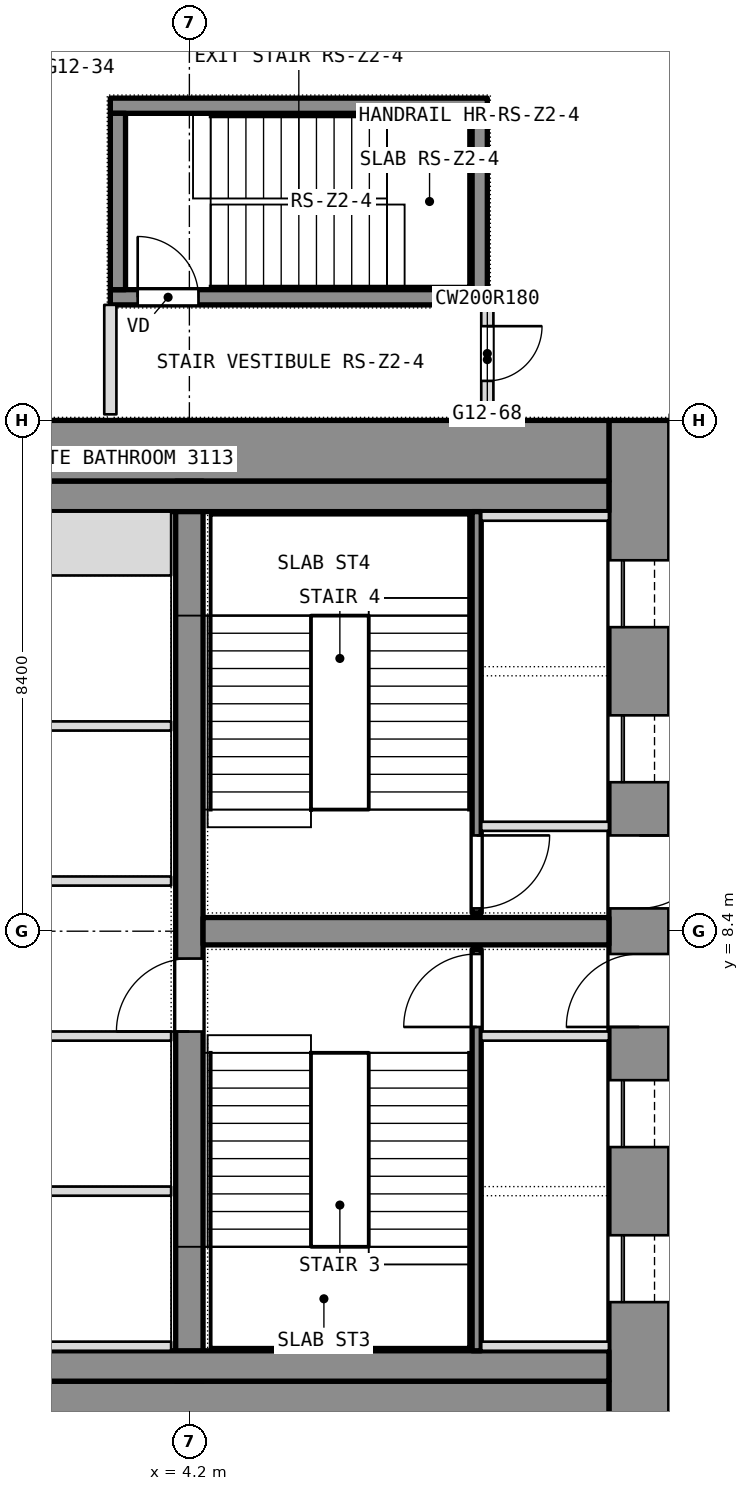
"""IFC4 building model, lengths in metres.
Left out: names, types, materials, properties, quantities, classifications, styles, units other than length and angle.
Written with IfcOpenShell. Run it as: python <this file> out.ifc"""

import sys

from ifc_helpers import new_model, si_unit, direction, frame, frame_2d, origin, place, context, subcontext, project, spatial, rectangle, extrude, element, fill, save


model = new_model("IFC4")
c1 = context("Model", 3, precision=1e-05, world=origin(), true_north=direction((0.0, 1.0)))
c2 = subcontext(c1, "Body", "Model", "MODEL_VIEW")
j1 = project(units=[si_unit("LENGTHUNIT", "METRE"), si_unit("PLANEANGLEUNIT", "RADIAN")], contexts=[c1])
p1 = place(None, origin())
s1 = spatial("IfcSite", under=j1, at=p1, CompositionType="ELEMENT")
p2 = place(p1, origin())
s2 = spatial("IfcBuilding", under=s1, at=p2, CompositionType="ELEMENT")
p3 = place(p2, frame((0.0, 0.0, 137.3)))
s3 = spatial("IfcBuildingStorey", under=s2, at=p3, CompositionType="ELEMENT", Elevation=137.3)
p4 = place(p3, frame((11.6, 0.0, 0.0), z_axis=(0.0, 0.0, 1.0), x_axis=(0.0, 1.0, 0.0)))
e1 = element("IfcWall", 1, at=p4, inside=s3, PredefinedType="SHEAR", context=c2, shape_type="SweptSolid", body=[
    extrude(rectangle(XDim=16.8, YDim=1.0, at=frame_2d((8.4, 0.0))), origin(), (0.0, 0.0, 1.0), 3.6),
])
p5 = place(p4, frame((2.3, 0.0, 0.0)))
e2 = element("IfcOpeningElement", 2, at=p5, cuts=e1, PredefinedType="OPENING", context=c2, shape_type="SweptSolid", body=[
    extrude(rectangle(XDim=1.1, YDim=2.1, at=frame_2d((0.55, 1.05))), frame((0.0, 0.5, 0.0), z_axis=(0.0, -1.0, 0.0), x_axis=(1.0, 0.0, 0.0)), (0.0, 0.0, 1.0), 1.0),
])
p6 = place(p4, frame((4.85, 0.0, 0.0)))
e3 = element("IfcOpeningElement", 3, at=p6, cuts=e1, PredefinedType="OPENING", context=c2, shape_type="SweptSolid", body=[
    extrude(rectangle(XDim=1.1, YDim=2.1, at=frame_2d((0.55, 1.05))), frame((0.0, 0.5, 0.0), z_axis=(0.0, -1.0, 0.0), x_axis=(1.0, 0.0, 0.0)), (0.0, 0.0, 1.0), 1.0),
])
p7 = place(p4, frame((6.825, 0.0, 0.0)))
e4 = element("IfcOpeningElement", 4, at=p7, cuts=e1, PredefinedType="OPENING", context=c2, shape_type="SweptSolid", body=[
    extrude(rectangle(XDim=1.2, YDim=2.1, at=frame_2d((0.6, 1.05))), frame((0.0, 0.5, 0.0), z_axis=(0.0, -1.0, 0.0), x_axis=(1.0, 0.0, 0.0)), (0.0, 0.0, 1.0), 1.0),
])
p8 = place(p4, frame((13.4, 0.0, 0.0)))
e5 = element("IfcOpeningElement", 5, at=p8, cuts=e1, PredefinedType="OPENING", context=c2, shape_type="SweptSolid", body=[
    extrude(rectangle(XDim=1.1, YDim=2.1, at=frame_2d((0.55, 1.05))), frame((0.0, 0.5, 0.0), z_axis=(0.0, -1.0, 0.0), x_axis=(1.0, 0.0, 0.0)), (0.0, 0.0, 1.0), 1.0),
])
p9 = place(p4, frame((10.85, 0.0, 0.0)))
e6 = element("IfcOpeningElement", 6, at=p9, cuts=e1, PredefinedType="OPENING", context=c2, shape_type="SweptSolid", body=[
    extrude(rectangle(XDim=1.1, YDim=2.1, at=frame_2d((0.55, 1.05))), frame((0.0, 0.5, 0.0), z_axis=(0.0, -1.0, 0.0), x_axis=(1.0, 0.0, 0.0)), (0.0, 0.0, 1.0), 1.0),
])
p10 = place(p4, frame((8.775, 0.0, 0.0)))
e7 = element("IfcOpeningElement", 7, at=p10, cuts=e1, PredefinedType="OPENING", context=c2, shape_type="SweptSolid", body=[
    extrude(rectangle(XDim=1.2, YDim=2.1, at=frame_2d((0.6, 1.05))), frame((0.0, 0.5, 0.0), z_axis=(0.0, -1.0, 0.0), x_axis=(1.0, 0.0, 0.0)), (0.0, 0.0, 1.0), 1.0),
])
for number, where, z_axis, x_axis in (
    (8, (-11.1, 0.5, 0.0), (0.0, 0.0, 1.0), (1.0, 0.0, 0.0)),
    (9, (-11.1, 16.3, 0.0), (0.0, 0.0, 1.0), (1.0, 0.0, 0.0)),
):
    element("IfcWall", number, at=place(p3, frame(where, z_axis=z_axis, x_axis=x_axis)), inside=s3, PredefinedType="SHEAR", context=c2, shape_type="SweptSolid", body=[
        extrude(rectangle(XDim=22.2, YDim=1.0, at=frame_2d((11.1, 0.0))), origin(), (0.0, 0.0, 1.0), 3.6),
    ])
p11 = place(p3, frame((4.2, 1.0, 0.0), z_axis=(0.0, 0.0, 1.0), x_axis=(0.0, 1.0, 0.0)))
e10 = element("IfcWall", 10, at=p11, inside=s3, PredefinedType="SHEAR", context=c2, shape_type="SweptSolid", body=[
    extrude(rectangle(XDim=14.8, YDim=0.45, at=frame_2d((7.4, 0.0))), origin(), (0.0, 0.0, 1.0), 3.6),
])
p12 = place(p11, frame((5.75, 0.0, 0.0)))
e11 = element("IfcOpeningElement", 11, at=p12, cuts=e10, PredefinedType="OPENING", context=c2, shape_type="SweptSolid", body=[
    extrude(rectangle(XDim=1.2, YDim=2.1, at=frame_2d((0.6, 1.05))), frame((0.0, 0.225, 0.0), z_axis=(0.0, -1.0, 0.0), x_axis=(1.0, 0.0, 0.0)), (0.0, 0.0, 1.0), 0.45),
])
p13 = place(p3, frame((4.425, 8.4, 0.0), z_axis=(0.0, 0.0, 1.0), x_axis=(1.0, 0.0, 0.0)))
e12 = element("IfcWall", 12, at=p13, inside=s3, PredefinedType="SHEAR", context=c2, shape_type="SweptSolid", body=[
    extrude(rectangle(XDim=6.675, YDim=0.45, at=frame_2d((3.337, 0.0))), origin(), (0.0, 0.0, 1.0), 3.6),
])
p14 = place(p3, frame((9.1, 16.9, 0.0), z_axis=(0.0, 0.0, 1.0), x_axis=(0.0, 1.0, 0.0)))
e13 = element("IfcWall", 13, at=p14, inside=s3, PredefinedType="PARTITIONING", context=c2, shape_type="SweptSolid", body=[
    extrude(rectangle(XDim=1.8, YDim=0.2, at=frame_2d((0.9, 0.0))), origin(), (0.0, 0.0, 1.0), 3.34),
])
p15 = place(p14, frame((0.55, 0.0, 0.0)))
e14 = element("IfcOpeningElement", 14, at=p15, cuts=e13, PredefinedType="OPENING", context=c2, shape_type="SweptSolid", body=[
    extrude(rectangle(XDim=0.9, YDim=2.1, at=frame_2d((0.45, 1.05))), frame((0.0, 0.1, 0.0), z_axis=(0.0, -1.0, 0.0), x_axis=(1.0, 0.0, 0.0)), (0.0, 0.0, 1.0), 0.2),
])
p16 = place(p3, frame((2.9, 16.9, 0.0), z_axis=(0.0, 0.0, 1.0), x_axis=(0.0, 1.0, 0.0)))
e15 = element("IfcWall", 15, at=p16, inside=s3, PredefinedType="PARTITIONING", context=c2, shape_type="SweptSolid", body=[
    extrude(rectangle(XDim=1.8, YDim=0.2, at=frame_2d((0.9, 0.0))), origin(), (0.0, 0.0, 1.0), 3.34),
])
for number, where, z_axis, x_axis in (
    (16, (-11.1, 1.25, 0.0), (0.0, 0.0, 1.0), (1.0, 0.0, 0.0)),
    (17, (-11.1, 15.55, 0.0), (0.0, 0.0, 1.0), (1.0, 0.0, 0.0)),
):
    element("IfcWall", number, at=place(p3, frame(where, z_axis=z_axis, x_axis=x_axis)), inside=s3, PredefinedType="PARTITIONING", context=c2, shape_type="SweptSolid", body=[
        extrude(rectangle(XDim=22.2, YDim=0.5, at=frame_2d((11.1, 0.0))), origin(), (0.0, 0.0, 1.0), 3.34),
    ])
p17 = place(p3, frame((8.925, 1.5, 0.0), z_axis=(0.0, 0.0, 1.0), x_axis=(0.0, 1.0, 0.0)))
e18 = element("IfcWall", 18, at=p17, inside=s3, PredefinedType="SHEAR", context=c2, shape_type="SweptSolid", body=[
    extrude(rectangle(XDim=6.6, YDim=0.15, at=frame_2d((3.3, 0.0))), origin(), (0.0, 0.0, 1.0), 3.34),
])
p18 = place(p17, frame((5.325, 0.0, 0.0)))
e19 = element("IfcOpeningElement", 19, at=p18, cuts=e18, PredefinedType="OPENING", context=c2, shape_type="SweptSolid", body=[
    extrude(rectangle(XDim=1.2, YDim=2.1, at=frame_2d((0.6, 1.05))), frame((0.0, 0.075, 0.0), z_axis=(0.0, -1.0, 0.0), x_axis=(1.0, 0.0, 0.0)), (0.0, 0.0, 1.0), 0.15),
])
for number, where, z_axis, x_axis in (
    (20, (9.0, 6.675, 0.0), (0.0, 0.0, 1.0), (1.0, 0.0, 0.0)),
    (21, (9.0, 1.575, 0.0), (0.0, 0.0, 1.0), (1.0, 0.0, 0.0)),
):
    element("IfcWall", number, at=place(p3, frame(where, z_axis=z_axis, x_axis=x_axis)), inside=s3, PredefinedType="SHEAR", context=c2, shape_type="SweptSolid", body=[
        extrude(rectangle(XDim=2.1, YDim=0.15, at=frame_2d((1.05, 0.0))), origin(), (0.0, 0.0, 1.0), 3.6),
    ])
p19 = place(p3, frame((8.925, 8.7, 0.0), z_axis=(0.0, 0.0, 1.0), x_axis=(0.0, 1.0, 0.0)))
e22 = element("IfcWall", 22, at=p19, inside=s3, PredefinedType="SHEAR", context=c2, shape_type="SweptSolid", body=[
    extrude(rectangle(XDim=6.6, YDim=0.15, at=frame_2d((3.3, 0.0))), origin(), (0.0, 0.0, 1.0), 3.34),
])
p20 = place(p19, frame((0.075, 0.0, 0.0)))
e23 = element("IfcOpeningElement", 23, at=p20, cuts=e22, PredefinedType="OPENING", context=c2, shape_type="SweptSolid", body=[
    extrude(rectangle(XDim=1.2, YDim=2.1, at=frame_2d((0.6, 1.05))), frame((0.0, 0.075, 0.0), z_axis=(0.0, -1.0, 0.0), x_axis=(1.0, 0.0, 0.0)), (0.0, 0.0, 1.0), 0.15),
])
for number, where, z_axis, x_axis in (
    (24, (9.0, 10.125, 0.0), (0.0, 0.0, 1.0), (1.0, 0.0, 0.0)),
    (25, (9.0, 15.225, 0.0), (0.0, 0.0, 1.0), (1.0, 0.0, 0.0)),
):
    element("IfcWall", number, at=place(p3, frame(where, z_axis=z_axis, x_axis=x_axis)), inside=s3, PredefinedType="SHEAR", context=c2, shape_type="SweptSolid", body=[
        extrude(rectangle(XDim=2.1, YDim=0.15, at=frame_2d((1.05, 0.0))), origin(), (0.0, 0.0, 1.0), 3.6),
    ])
p21 = place(p3, frame((-3.9, 4.125, 0.0), z_axis=(0.0, 0.0, 1.0), x_axis=(1.0, 0.0, 0.0)))
e26 = element("IfcWall", 26, at=p21, inside=s3, PredefinedType="PARTITIONING", context=c2, shape_type="SweptSolid", body=[
    extrude(rectangle(XDim=7.8, YDim=0.15, at=frame_2d((3.9, 0.0))), origin(), (0.0, 0.0, 1.0), 3.34),
])
p22 = place(p21, frame((3.75, 0.0, 0.0)))
e27 = element("IfcOpeningElement", 27, at=p22, cuts=e26, PredefinedType="OPENING", context=c2, shape_type="SweptSolid", body=[
    extrude(rectangle(XDim=1.2, YDim=2.1, at=frame_2d((0.6, 1.05))), frame((0.0, 0.075, 0.0), z_axis=(0.0, -1.0, 0.0), x_axis=(1.0, 0.0, 0.0)), (0.0, 0.0, 1.0), 0.15),
])
p23 = place(p3, frame((-3.9, 11.775, 0.0), z_axis=(0.0, 0.0, 1.0), x_axis=(1.0, 0.0, 0.0)))
e28 = element("IfcWall", 28, at=p23, inside=s3, PredefinedType="PARTITIONING", context=c2, shape_type="SweptSolid", body=[
    extrude(rectangle(XDim=7.8, YDim=0.15, at=frame_2d((3.9, 0.0))), origin(), (0.0, 0.0, 1.0), 3.34),
])
p24 = place(p23, frame((3.3, 0.0, 0.0)))
e29 = element("IfcOpeningElement", 29, at=p24, cuts=e28, PredefinedType="OPENING", context=c2, shape_type="SweptSolid", body=[
    extrude(rectangle(XDim=1.2, YDim=2.1, at=frame_2d((0.6, 1.05))), frame((0.0, 0.075, 0.0), z_axis=(0.0, -1.0, 0.0), x_axis=(1.0, 0.0, 0.0)), (0.0, 0.0, 1.0), 0.15),
])
p25 = place(p3, frame((1.65, 1.575, 0.0), z_axis=(0.0, 0.0, 1.0), x_axis=(1.0, 0.0, 0.0)))
e30 = element("IfcWall", 30, at=p25, inside=s3, PredefinedType="SHEAR", context=c2, shape_type="SweptSolid", body=[
    extrude(rectangle(XDim=2.25, YDim=0.15, at=frame_2d((1.125, 0.0))), origin(), (0.0, 0.0, 1.0), 3.6),
])
p26 = place(p3, frame((1.65, 14.775, 0.0), z_axis=(0.0, 0.0, 1.0), x_axis=(1.0, 0.0, 0.0)))
e31 = element("IfcWall", 31, at=p26, inside=s3, PredefinedType="SHEAR", context=c2, shape_type="SweptSolid", body=[
    extrude(rectangle(XDim=2.25, YDim=1.05, at=frame_2d((1.125, 0.0))), origin(), (0.0, 0.0, 1.0), 3.6),
])
for number, where, z_axis, x_axis in (
    (32, (1.65, 6.675, 0.0), (0.0, 0.0, 1.0), (1.0, 0.0, 0.0)),
    (33, (1.65, 9.225, 0.0), (0.0, 0.0, 1.0), (1.0, 0.0, 0.0)),
):
    element("IfcWall", number, at=place(p3, frame(where, z_axis=z_axis, x_axis=x_axis)), inside=s3, PredefinedType="SHEAR", context=c2, shape_type="SweptSolid", body=[
        extrude(rectangle(XDim=2.25, YDim=0.15, at=frame_2d((1.125, 0.0))), origin(), (0.0, 0.0, 1.0), 3.6),
    ])
p27 = place(p3, frame((12.1, 16.8, 0.0), z_axis=(0.0, 0.0, 1.0), x_axis=(1.0, 0.0, 0.0)))
e34 = element("IfcWall", 34, at=p27, inside=s3, PredefinedType="PARTITIONING", context=c2, shape_type="SweptSolid", body=[
    extrude(rectangle(XDim=4.6, YDim=0.2, at=frame_2d((2.3, 0.0))), origin(), (0.0, 0.0, 1.0), 2.89),
])
p28 = place(p3, frame((2.9, 18.825, 0.1), z_axis=(0.0, 0.0, 1.0), x_axis=(1.0, 0.0, 0.0)))
e35 = element("IfcWall", 35, at=p28, inside=s3, PredefinedType="SHEAR", context=c2, shape_type="SweptSolid", body=[
    extrude(rectangle(XDim=6.2, YDim=0.25, at=frame_2d((3.1, 0.0))), origin(), (0.0, 0.0, 1.0), 3.6),
])
p29 = place(p28, frame((0.45, 0.0, 0.0)))
e36 = element("IfcOpeningElement", 36, at=p29, cuts=e35, PredefinedType="OPENING", context=c2, shape_type="SweptSolid", body=[
    extrude(rectangle(XDim=1.0, YDim=2.1, at=frame_2d((0.5, 1.05))), frame((0.0, 0.125, 0.0), z_axis=(0.0, -1.0, 0.0), x_axis=(1.0, 0.0, 0.0)), (0.0, 0.0, 1.0), 0.25),
])
p30 = place(p3, frame((2.9, 21.975, 0.1), z_axis=(0.0, 0.0, 1.0), x_axis=(1.0, 0.0, 0.0)))
e37 = element("IfcWall", 37, at=p30, inside=s3, PredefinedType="SHEAR", context=c2, shape_type="SweptSolid", body=[
    extrude(rectangle(XDim=6.2, YDim=0.25, at=frame_2d((3.1, 0.0))), origin(), (0.0, 0.0, 1.0), 3.6),
])
for number, where, z_axis, x_axis in (
    (38, (3.025, 18.95, 0.1), (0.0, 0.0, 1.0), (0.0, 1.0, 0.0)),
    (39, (8.975, 18.95, 0.1), (0.0, 0.0, 1.0), (0.0, 1.0, 0.0)),
):
    element("IfcWall", number, at=place(p3, frame(where, z_axis=z_axis, x_axis=x_axis)), inside=s3, PredefinedType="SHEAR", context=c2, shape_type="SweptSolid", body=[
        extrude(rectangle(XDim=2.9, YDim=0.25, at=frame_2d((1.45, 0.0))), origin(), (0.0, 0.0, 1.0), 3.6),
    ])
p31 = place(p15, origin())
e40 = element("IfcDoor", 40, at=p31, inside=s3, OperationType="SINGLE_SWING_RIGHT", PredefinedType="DOOR", context=c2, shape_type="SweptSolid", body=[
    extrude(rectangle(XDim=0.9, YDim=2.1, at=frame_2d((0.45, 1.05))), frame((0.0, 0.025, 0.0), z_axis=(0.0, -1.0, 0.0), x_axis=(1.0, 0.0, 0.0)), (0.0, 0.0, 1.0), 0.05),
])
fill(e14, e40)
p32 = place(p29, origin())
e41 = element("IfcDoor", 41, at=p32, inside=s3, OperationType="SINGLE_SWING_LEFT", PredefinedType="DOOR", context=c2, shape_type="SweptSolid", body=[
    extrude(rectangle(XDim=1.0, YDim=2.1, at=frame_2d((0.5, 1.05))), frame((0.0, 0.025, 0.0), z_axis=(0.0, -1.0, 0.0), x_axis=(1.0, 0.0, 0.0)), (0.0, 0.0, 1.0), 0.05),
])
fill(e36, e41)
p33 = place(p5, origin())
e42 = element("IfcDoor", 42, at=p33, inside=s3, OperationType="SLIDING_TO_LEFT", PredefinedType="DOOR", context=c2, shape_type="SweptSolid", body=[
    extrude(rectangle(XDim=1.1, YDim=2.1, at=frame_2d((0.55, 1.05))), frame((0.0, 0.025, 0.0), z_axis=(0.0, -1.0, 0.0), x_axis=(1.0, 0.0, 0.0)), (0.0, 0.0, 1.0), 0.05),
])
fill(e2, e42)
p34 = place(p6, origin())
e43 = element("IfcDoor", 43, at=p34, inside=s3, OperationType="SLIDING_TO_LEFT", PredefinedType="DOOR", context=c2, shape_type="SweptSolid", body=[
    extrude(rectangle(XDim=1.1, YDim=2.1, at=frame_2d((0.55, 1.05))), frame((0.0, 0.025, 0.0), z_axis=(0.0, -1.0, 0.0), x_axis=(1.0, 0.0, 0.0)), (0.0, 0.0, 1.0), 0.05),
])
fill(e3, e43)
p35 = place(p7, origin())
e44 = element("IfcDoor", 44, at=p35, inside=s3, OperationType="SINGLE_SWING_LEFT", PredefinedType="DOOR", context=c2, shape_type="SweptSolid", body=[
    extrude(rectangle(XDim=1.2, YDim=2.1, at=frame_2d((0.6, 1.05))), frame((0.0, 0.025, 0.0), z_axis=(0.0, -1.0, 0.0), x_axis=(1.0, 0.0, 0.0)), (0.0, 0.0, 1.0), 0.05),
])
fill(e4, e44)
p36 = place(p18, origin())
e45 = element("IfcDoor", 45, at=p36, inside=s3, OperationType="SINGLE_SWING_LEFT", PredefinedType="DOOR", context=c2, shape_type="SweptSolid", body=[
    extrude(rectangle(XDim=1.2, YDim=2.1, at=frame_2d((0.6, 1.05))), frame((0.0, 0.025, 0.0), z_axis=(0.0, -1.0, 0.0), x_axis=(1.0, 0.0, 0.0)), (0.0, 0.0, 1.0), 0.05),
])
fill(e19, e45)
p37 = place(p8, origin())
e46 = element("IfcDoor", 46, at=p37, inside=s3, OperationType="SLIDING_TO_LEFT", PredefinedType="DOOR", context=c2, shape_type="SweptSolid", body=[
    extrude(rectangle(XDim=1.1, YDim=2.1, at=frame_2d((0.55, 1.05))), frame((0.0, 0.025, 0.0), z_axis=(0.0, -1.0, 0.0), x_axis=(1.0, 0.0, 0.0)), (0.0, 0.0, 1.0), 0.05),
])
fill(e5, e46)
p38 = place(p9, origin())
e47 = element("IfcDoor", 47, at=p38, inside=s3, OperationType="SLIDING_TO_LEFT", PredefinedType="DOOR", context=c2, shape_type="SweptSolid", body=[
    extrude(rectangle(XDim=1.1, YDim=2.1, at=frame_2d((0.55, 1.05))), frame((0.0, 0.025, 0.0), z_axis=(0.0, -1.0, 0.0), x_axis=(1.0, 0.0, 0.0)), (0.0, 0.0, 1.0), 0.05),
])
fill(e6, e47)
p39 = place(p10, origin())
e48 = element("IfcDoor", 48, at=p39, inside=s3, OperationType="SINGLE_SWING_LEFT", PredefinedType="DOOR", context=c2, shape_type="SweptSolid", body=[
    extrude(rectangle(XDim=1.2, YDim=2.1, at=frame_2d((0.6, 1.05))), frame((0.0, 0.025, 0.0), z_axis=(0.0, -1.0, 0.0), x_axis=(1.0, 0.0, 0.0)), (0.0, 0.0, 1.0), 0.05),
])
fill(e7, e48)
p40 = place(p20, origin())
e49 = element("IfcDoor", 49, at=p40, inside=s3, OperationType="SINGLE_SWING_LEFT", PredefinedType="DOOR", context=c2, shape_type="SweptSolid", body=[
    extrude(rectangle(XDim=1.2, YDim=2.1, at=frame_2d((0.6, 1.05))), frame((0.0, 0.025, 0.0), z_axis=(0.0, -1.0, 0.0), x_axis=(1.0, 0.0, 0.0)), (0.0, 0.0, 1.0), 0.05),
])
fill(e23, e49)
p41 = place(p12, origin())
e50 = element("IfcDoor", 50, at=p41, inside=s3, OperationType="SINGLE_SWING_LEFT", PredefinedType="DOOR", context=c2, shape_type="SweptSolid", body=[
    extrude(rectangle(XDim=1.2, YDim=2.1, at=frame_2d((0.6, 1.05))), frame((0.0, 0.025, 0.0), z_axis=(0.0, -1.0, 0.0), x_axis=(1.0, 0.0, 0.0)), (0.0, 0.0, 1.0), 0.05),
])
fill(e11, e50)
save(model, sys.argv[1])
